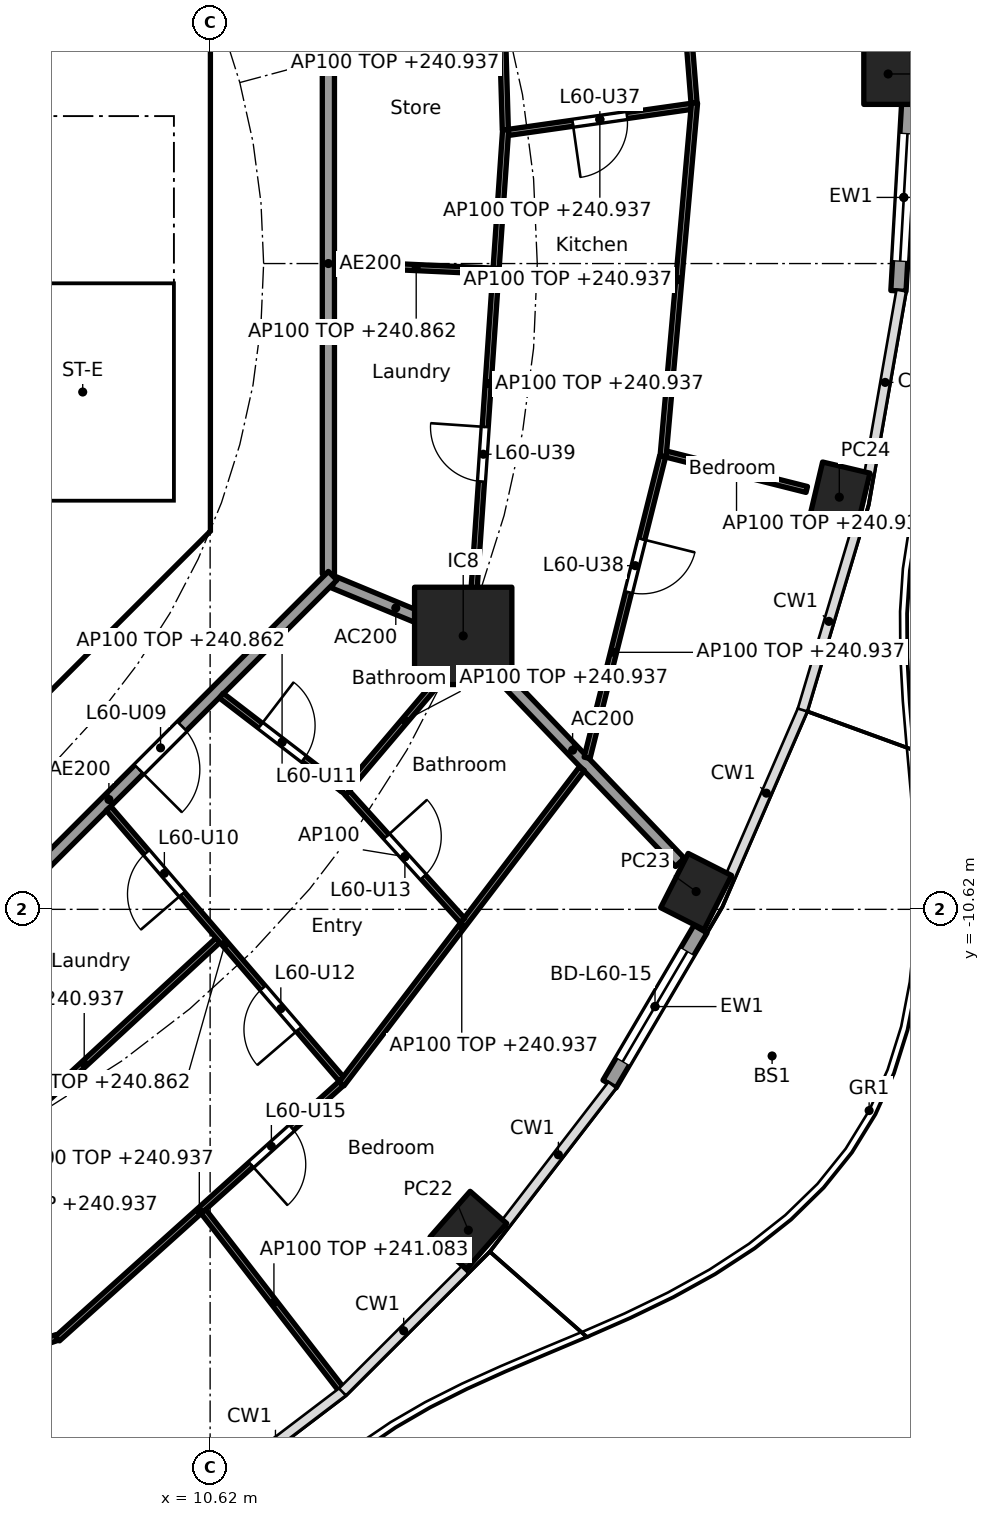
"""IFC4 building model, lengths in metres.
Left out: names, types, materials, properties, quantities, classifications, styles, units other than length and angle.
Written with IfcOpenShell. Run it as: python <this file> out.ifc"""

import sys

from ifc_helpers import new_model, si_unit, direction, frame, frame_2d, origin, origin_2d, place, context, subcontext, project, spatial, polyline, rectangle, hollow_rectangle, outline, extrude, element, fill, save


model = new_model("IFC4")
c1 = context("Model", 3, precision=1e-05, world=origin(), true_north=direction((0.0, 1.0)))
c2 = subcontext(c1, "Body", "Model", "MODEL_VIEW")
j1 = project(units=[si_unit("LENGTHUNIT", "METRE"), si_unit("PLANEANGLEUNIT", "RADIAN")], contexts=[c1])
p1 = place(None, origin())
s1 = spatial("IfcSite", under=j1, at=p1, CompositionType="ELEMENT")
p2 = place(p1, origin())
s2 = spatial("IfcBuilding", under=s1, at=p2, CompositionType="ELEMENT")
p3 = place(p2, frame((0.0, 0.0, 238.1)))
s3 = spatial("IfcBuildingStorey", under=s2, at=p3, CompositionType="ELEMENT", Elevation=238.1)
for number, where, z_axis, x_axis in (
    (1, (21.77, 3.118, 0.0), (0.0, 0.0, 1.0), (0.0, 1.0, 0.0)),
    (2, (14.866, -15.896, 0.0), (0.0, 0.0, 1.0), (0.66, 0.751, 0.0)),
    (3, (18.612, -10.327, 0.0), (0.0, 0.0, 1.0), (0.452, 0.892, 0.0)),
    (4, (20.967, -3.842, 0.0), (0.0, 0.0, 1.0), (0.229, 0.973, 0.0)),
):
    element("IfcColumn", number, at=place(p3, frame(where, z_axis=z_axis, x_axis=x_axis)), inside=s3, PredefinedType="COLUMN", context=c2, shape_type="SweptSolid", body=[
        extrude(hollow_rectangle(XDim=1.0, YDim=0.8, WallThickness=0.032, at=origin_2d()), origin(), (0.0, 0.0, 1.0), 3.7),
    ])
p4 = place(p3, frame((14.782, -6.123, 0.0), z_axis=(0.0, 0.0, 1.0), x_axis=(1.0, 0.0, 0.0)))
e5 = element("IfcColumn", 5, at=p4, inside=s3, PredefinedType="COLUMN", context=c2, shape_type="SweptSolid", body=[
    extrude(rectangle(XDim=1.6, YDim=1.6, at=origin_2d()), origin(), (0.0, 0.0, 1.0), 3.7),
])
p5 = place(p3, frame((18.684, -10.945, 0.0), z_axis=(0.0, 0.0, 1.0), x_axis=(-0.5063555387, -0.862324804484, 0.0)))
e6 = element("IfcWall", 6, at=p5, inside=s3, PredefinedType="SOLIDWALL", context=c2, shape_type="SweptSolid", body=[
    extrude(rectangle(XDim=2.955, YDim=0.25, at=frame_2d((1.477, 0.0))), origin(), (0.0, 0.0, 1.0), 3.44),
])
p6 = place(p5, frame((0.427, 0.0, 0.0)))
e7 = element("IfcOpeningElement", 7, at=p6, cuts=e6, PredefinedType="OPENING", context=c2, shape_type="SweptSolid", body=[
    extrude(rectangle(XDim=2.1, YDim=2.4, at=frame_2d((1.05, 1.2))), frame((0.0, 0.135, 0.0), z_axis=(0.0, -1.0, 0.0), x_axis=(1.0, 0.0, 0.0)), (0.0, 0.0, 1.0), 0.27),
])
p7 = place(p3, frame((22.116, 2.626, 0.0), z_axis=(0.0, 0.0, 1.0), x_axis=(-0.057528189427, -0.998343882348, 0.0)))
e8 = element("IfcWall", 8, at=p7, inside=s3, PredefinedType="SOLIDWALL", context=c2, shape_type="SweptSolid", body=[
    extrude(rectangle(XDim=3.081, YDim=0.25, at=frame_2d((1.541, 0.0))), origin(), (0.0, 0.0, 1.0), 3.44),
])
p8 = place(p7, frame((0.49, 0.0, 0.0)))
e9 = element("IfcOpeningElement", 9, at=p8, cuts=e8, PredefinedType="OPENING", context=c2, shape_type="SweptSolid", body=[
    extrude(rectangle(XDim=2.1, YDim=2.4, at=frame_2d((1.05, 1.2))), frame((0.0, 0.135, 0.0), z_axis=(0.0, -1.0, 0.0), x_axis=(1.0, 0.0, 0.0)), (0.0, 0.0, 1.0), 0.27),
])
p9 = place(p3, frame((4.613, -9.988, 0.0), z_axis=(0.0, 0.0, 1.0), x_axis=(0.707106781187, 0.707106781187, 0.0)))
e10 = element("IfcWall", 10, at=p9, inside=s3, PredefinedType="SHEAR", context=c2, shape_type="SweptSolid", body=[
    extrude(rectangle(XDim=7.602, YDim=0.6, at=frame_2d((3.801, 0.0))), origin(), (0.0, 0.0, 1.0), 3.44),
])
p10 = place(p9, frame((3.201, 0.0, 0.0)))
e11 = element("IfcOpeningElement", 11, at=p10, cuts=e10, PredefinedType="OPENING", context=c2, shape_type="SweptSolid", body=[
    extrude(rectangle(XDim=1.2, YDim=2.1, at=frame_2d((0.6, 1.05))), frame((0.0, 0.31, 0.0), z_axis=(0.0, -1.0, 0.0), x_axis=(1.0, 0.0, 0.0)), (0.0, 0.0, 1.0), 0.62),
])
p11 = place(p3, origin())
e12 = element("IfcWall", 12, at=p11, inside=s3, PredefinedType="SHEAR", context=c2, shape_type="SweptSolid", body=[
    extrude(outline(polyline([(9.776, -4.401), (10.025, -4.152), (10.025, -3.801), (10.025, 4.152), (9.776, 4.401), (10.2, 4.825), (10.625, 4.401), (10.625, -4.401), (10.2, -4.825), (9.776, -4.401)])), origin(), (0.0, 0.0, 1.0), 3.44),
])
p12 = place(p3, origin())
e13 = element("IfcWall", 13, at=p12, inside=s3, PredefinedType="SOLIDWALL", context=c2, shape_type="SweptSolid", body=[
    extrude(outline(polyline([(10.025, -4.1), (6.7, -4.1), (6.7, -3.9), (10.025, -3.9), (10.025, -4.1)])), origin(), (0.0, 0.0, 1.0), 3.44),
])
p13 = place(p3, frame((12.657, -5.243, 0.0), z_axis=(0.0, 0.0, 1.0), x_axis=(0.923853160736, -0.382747093259, 0.0)))
e14 = element("IfcWall", 14, at=p13, inside=s3, PredefinedType="PARTITIONING", context=c2, shape_type="SweptSolid", body=[
    extrude(rectangle(XDim=2.2, YDim=0.2, at=frame_2d((1.1, 0.0))), origin(), (0.0, 0.0, 1.0), 3.44),
])
p14 = place(p3, frame((14.817, -6.159, 0.0), z_axis=(0.0, 0.0, 1.0), x_axis=(0.691437669875, -0.722436120828, 0.0)))
e15 = element("IfcWall", 15, at=p14, inside=s3, PredefinedType="PARTITIONING", context=c2, shape_type="SweptSolid", body=[
    extrude(rectangle(XDim=5.104, YDim=0.2, at=frame_2d((2.552, 0.0))), origin(), (0.0, 0.0, 1.0), 3.44),
])
p15 = place(p3, frame((12.565, -5.104, 0.0), z_axis=(0.0, 0.0, 1.0), x_axis=(0.0, 1.0, 0.0)))
e16 = element("IfcWall", 16, at=p15, inside=s3, PredefinedType="PARTITIONING", context=c2, shape_type="SweptSolid", body=[
    extrude(rectangle(XDim=10.209, YDim=0.2, at=frame_2d((5.104, 0.0))), origin(), (0.0, 0.0, 1.0), 3.44),
])
p16 = place(p3, frame((5.275, -12.494, 0.0), z_axis=(0.0, 0.0, 1.0), x_axis=(0.707106781187, 0.707106781187, 0.0)))
e17 = element("IfcWall", 17, at=p16, inside=s3, PredefinedType="PARTITIONING", context=c2, shape_type="SweptSolid", body=[
    extrude(rectangle(XDim=10.409, YDim=0.2, at=frame_2d((5.205, 0.0))), origin(), (0.0, 0.0, 1.0), 3.44),
])
p17 = place(p16, frame((5.906, 0.0, 0.0)))
e18 = element("IfcOpeningElement", 18, at=p17, cuts=e17, PredefinedType="OPENING", context=c2, shape_type="SweptSolid", body=[
    extrude(rectangle(XDim=1.0, YDim=2.1, at=frame_2d((0.5, 1.05))), frame((0.0, 0.11, 0.0), z_axis=(0.0, -1.0, 0.0), x_axis=(1.0, 0.0, 0.0)), (0.0, 0.0, 1.0), 0.22),
])
p18 = place(p3, frame((15.526, 2.157, 0.0), z_axis=(0.0, 0.0, 1.0), x_axis=(0.989997669831, 0.141083711779, 0.0)))
e19 = element("IfcWall", 19, at=p18, inside=s3, PredefinedType="PARTITIONING", context=c2, shape_type="SweptSolid", body=[
    extrude(rectangle(XDim=3.037, YDim=0.1, at=frame_2d((1.519, 0.0))), origin(), (0.0, 0.0, 1.0), 2.837),
])
p19 = place(p18, frame((1.069, 0.0, 0.0)))
e20 = element("IfcOpeningElement", 20, at=p19, cuts=e19, PredefinedType="OPENING", context=c2, shape_type="SweptSolid", body=[
    extrude(rectangle(XDim=0.9, YDim=2.1, at=frame_2d((0.45, 1.05))), frame((0.0, 0.06, 0.0), z_axis=(0.0, -1.0, 0.0), x_axis=(1.0, 0.0, 0.0)), (0.0, 0.0, 1.0), 0.12),
])
p20 = place(p3, frame((15.475, 2.2, 0.0), z_axis=(0.0, 0.0, 1.0), x_axis=(-0.029254637498, 0.999571991497, 0.0)))
e21 = element("IfcWall", 21, at=p20, inside=s3, PredefinedType="PARTITIONING", context=c2, shape_type="SweptSolid", body=[
    extrude(rectangle(XDim=4.223, YDim=0.1, at=frame_2d((2.111, 0.0))), origin(), (0.0, 0.0, 1.0), 2.837),
])
p21 = place(p20, frame((1.661, 0.0, 0.0)))
e22 = element("IfcOpeningElement", 22, at=p21, cuts=e21, PredefinedType="OPENING", context=c2, shape_type="SweptSolid", body=[
    extrude(rectangle(XDim=0.9, YDim=2.1, at=frame_2d((0.45, 1.05))), frame((0.0, 0.06, 0.0), z_axis=(0.0, -1.0, 0.0), x_axis=(1.0, 0.0, 0.0)), (0.0, 0.0, 1.0), 0.12),
])
p22 = place(p3, frame((15.48, 2.199, 0.0), z_axis=(0.0, 0.0, 1.0), x_axis=(-0.068558685949, -0.997647085186, 0.0)))
e23 = element("IfcWall", 23, at=p22, inside=s3, PredefinedType="PARTITIONING", context=c2, shape_type="SweptSolid", body=[
    extrude(rectangle(XDim=8.365, YDim=0.1, at=frame_2d((4.183, 0.0))), origin(), (0.0, 0.0, 1.0), 2.837),
])
p23 = place(p22, frame((4.898, 0.0, 0.0)))
e24 = element("IfcOpeningElement", 24, at=p23, cuts=e23, PredefinedType="OPENING", context=c2, shape_type="SweptSolid", body=[
    extrude(rectangle(XDim=0.9, YDim=2.1, at=frame_2d((0.45, 1.05))), frame((0.0, 0.06, 0.0), z_axis=(0.0, -1.0, 0.0), x_axis=(1.0, 0.0, 0.0)), (0.0, 0.0, 1.0), 0.12),
])
p24 = place(p3, frame((18.578, 2.642, 0.0), z_axis=(0.0, 0.0, 1.0), x_axis=(-0.079179272956, 0.9968603928, 0.0)))
e25 = element("IfcWall", 25, at=p24, inside=s3, PredefinedType="PARTITIONING", context=c2, shape_type="SweptSolid", body=[
    extrude(rectangle(XDim=5.504, YDim=0.1, at=frame_2d((2.752, 0.0))), origin(), (0.0, 0.0, 1.0), 2.837),
])
p25 = place(p24, frame((0.926, 0.0, 0.0)))
e26 = element("IfcOpeningElement", 26, at=p25, cuts=e25, PredefinedType="OPENING", context=c2, shape_type="SweptSolid", body=[
    extrude(rectangle(XDim=0.9, YDim=2.1, at=frame_2d((0.45, 1.05))), frame((0.0, 0.06, 0.0), z_axis=(0.0, -1.0, 0.0), x_axis=(1.0, 0.0, 0.0)), (0.0, 0.0, 1.0), 0.12),
])
p26 = place(p3, frame((18.586, 2.642, 0.0), z_axis=(0.0, 0.0, 1.0), x_axis=(-0.088638473361, -0.996063863937, 0.0)))
e27 = element("IfcWall", 27, at=p26, inside=s3, PredefinedType="PARTITIONING", context=c2, shape_type="SweptSolid", body=[
    extrude(rectangle(XDim=5.836, YDim=0.1, at=frame_2d((2.918, 0.0))), origin(), (0.0, 0.0, 1.0), 2.837),
])
p27 = place(p3, frame((3.453, -19.229, 0.0), z_axis=(0.0, 0.0, 1.0), x_axis=(0.947572025416, 0.319542261133, 0.0)))
e28 = element("IfcWall", 28, at=p27, inside=s3, PredefinedType="PARTITIONING", context=c2, shape_type="SweptSolid", body=[
    extrude(rectangle(XDim=4.903, YDim=0.1, at=frame_2d((2.451, 0.0))), origin(), (0.0, 0.0, 1.0), 2.837),
])
p28 = place(p27, frame((2.001, 0.0, 0.0)))
e29 = element("IfcOpeningElement", 29, at=p28, cuts=e28, PredefinedType="OPENING", context=c2, shape_type="SweptSolid", body=[
    extrude(rectangle(XDim=0.9, YDim=2.1, at=frame_2d((0.45, 1.05))), frame((0.0, 0.06, 0.0), z_axis=(0.0, -1.0, 0.0), x_axis=(1.0, 0.0, 0.0)), (0.0, 0.0, 1.0), 0.12),
])
p29 = place(p3, frame((6.351, -15.19, 0.0), z_axis=(0.0, 0.0, 1.0), x_axis=(0.73462674599, 0.678471476243, 0.0)))
e30 = element("IfcWall", 30, at=p29, inside=s3, PredefinedType="PARTITIONING", context=c2, shape_type="SweptSolid", body=[
    extrude(rectangle(XDim=5.987, YDim=0.1, at=frame_2d((2.993, 0.0))), origin(), (0.0, 0.0, 1.0), 2.837),
])
p30 = place(p3, frame((8.109, -17.679, 0.0), z_axis=(0.0, 0.0, 1.0), x_axis=(0.743675165651, 0.668541134108, 0.0)))
e31 = element("IfcWall", 31, at=p30, inside=s3, PredefinedType="PARTITIONING", context=c2, shape_type="SweptSolid", body=[
    extrude(rectangle(XDim=6.275, YDim=0.1, at=frame_2d((3.137, 0.0))), origin(), (0.0, 0.0, 1.0), 2.837),
])
p31 = place(p30, frame((4.281, 0.0, 0.0)))
e32 = element("IfcOpeningElement", 32, at=p31, cuts=e31, PredefinedType="OPENING", context=c2, shape_type="SweptSolid", body=[
    extrude(rectangle(XDim=0.9, YDim=2.1, at=frame_2d((0.45, 1.05))), frame((0.0, 0.06, 0.0), z_axis=(0.0, -1.0, 0.0), x_axis=(1.0, 0.0, 0.0)), (0.0, 0.0, 1.0), 0.12),
])
p32 = place(p3, frame((10.51, -15.588, 0.0), z_axis=(0.0, 0.0, 1.0), x_axis=(0.612443725286, -0.79051418922, 0.0)))
e33 = element("IfcWall", 33, at=p32, inside=s3, PredefinedType="PARTITIONING", context=c2, shape_type="SweptSolid", body=[
    extrude(rectangle(XDim=3.785, YDim=0.1, at=frame_2d((1.893, 0.0))), origin(), (0.0, 0.0, 1.0), 2.983),
])
p33 = place(p3, frame((8.95, -8.96, 0.0), z_axis=(0.0, 0.0, 1.0), x_axis=(0.652098047064, -0.758134643065, 0.0)))
e34 = element("IfcWall", 34, at=p33, inside=s3, PredefinedType="PARTITIONING", context=c2, shape_type="SweptSolid", body=[
    extrude(rectangle(XDim=5.874, YDim=0.1, at=frame_2d((2.937, 0.0))), origin(), (0.0, 0.0, 1.0), 2.762),
])
p34 = place(p33, frame((0.957, 0.0, 0.0)))
e35 = element("IfcOpeningElement", 35, at=p34, cuts=e34, PredefinedType="OPENING", context=c2, shape_type="SweptSolid", body=[
    extrude(rectangle(XDim=0.9, YDim=2.1, at=frame_2d((0.45, 1.05))), frame((0.0, 0.06, 0.0), z_axis=(0.0, -1.0, 0.0), x_axis=(1.0, 0.0, 0.0)), (0.0, 0.0, 1.0), 0.12),
])
p35 = place(p33, frame((3.894, 0.0, 0.0)))
e36 = element("IfcOpeningElement", 36, at=p35, cuts=e34, PredefinedType="OPENING", context=c2, shape_type="SweptSolid", body=[
    extrude(rectangle(XDim=0.9, YDim=2.1, at=frame_2d((0.45, 1.05))), frame((0.0, 0.06, 0.0), z_axis=(0.0, -1.0, 0.0), x_axis=(1.0, 0.0, 0.0)), (0.0, 0.0, 1.0), 0.12),
])
p36 = place(p3, frame((12.782, -13.491, 0.0), z_axis=(0.0, 0.0, 1.0), x_axis=(0.606141365852, 0.79535692906, 0.0)))
e37 = element("IfcWall", 37, at=p36, inside=s3, PredefinedType="PARTITIONING", context=c2, shape_type="SweptSolid", body=[
    extrude(rectangle(XDim=6.52, YDim=0.1, at=frame_2d((3.26, 0.0))), origin(), (0.0, 0.0, 1.0), 2.837),
])
p37 = place(p3, frame((10.804, -7.105, 0.0), z_axis=(0.0, 0.0, 1.0), x_axis=(0.793311502848, -0.608815948747, 0.0)))
e38 = element("IfcWall", 38, at=p37, inside=s3, PredefinedType="PARTITIONING", context=c2, shape_type="SweptSolid", body=[
    extrude(rectangle(XDim=2.52, YDim=0.1, at=frame_2d((1.26, 0.0))), origin(), (0.0, 0.0, 1.0), 2.762),
])
p38 = place(p37, frame((0.81, 0.0, 0.0)))
e39 = element("IfcOpeningElement", 39, at=p38, cuts=e38, PredefinedType="OPENING", context=c2, shape_type="SweptSolid", body=[
    extrude(rectangle(XDim=0.9, YDim=2.1, at=frame_2d((0.45, 1.05))), frame((0.0, 0.06, 0.0), z_axis=(0.0, -1.0, 0.0), x_axis=(1.0, 0.0, 0.0)), (0.0, 0.0, 1.0), 0.12),
])
p39 = place(p3, frame((12.876, -8.707, 0.0), z_axis=(0.0, 0.0, 1.0), x_axis=(0.670768418052, -0.741666858733, 0.0)))
e40 = element("IfcWall", 40, at=p39, inside=s3, PredefinedType="PARTITIONING", context=c2, shape_type="SweptSolid", body=[
    extrude(rectangle(XDim=2.824, YDim=0.1, at=frame_2d((1.412, 0.0))), origin(), (0.0, 0.0, 1.0), 3.44),
])
p40 = place(p39, frame((0.962, 0.0, 0.0)))
e41 = element("IfcOpeningElement", 41, at=p40, cuts=e40, PredefinedType="OPENING", context=c2, shape_type="SweptSolid", body=[
    extrude(rectangle(XDim=0.9, YDim=2.1, at=frame_2d((0.45, 1.05))), frame((0.0, 0.06, 0.0), z_axis=(0.0, -1.0, 0.0), x_axis=(1.0, 0.0, 0.0)), (0.0, 0.0, 1.0), 0.12),
])
p41 = place(p3, frame((12.81, -8.708, 0.0), z_axis=(0.0, 0.0, 1.0), x_axis=(0.646973324627, 0.762512634138, 0.0)))
e42 = element("IfcWall", 42, at=p41, inside=s3, PredefinedType="PARTITIONING", context=c2, shape_type="SweptSolid", body=[
    extrude(rectangle(XDim=3.129, YDim=0.1, at=frame_2d((1.565, 0.0))), origin(), (0.0, 0.0, 1.0), 2.837),
])
p42 = place(p3, frame((16.819, -8.129, 0.0), z_axis=(0.0, 0.0, 1.0), x_axis=(0.243041266705, 0.970015949703, 0.0)))
e43 = element("IfcWall", 43, at=p42, inside=s3, PredefinedType="PARTITIONING", context=c2, shape_type="SweptSolid", body=[
    extrude(rectangle(XDim=5.112, YDim=0.1, at=frame_2d((2.556, 0.0))), origin(), (0.0, 0.0, 1.0), 2.837),
])
p43 = place(p42, frame((2.808, 0.0, 0.0)))
e44 = element("IfcOpeningElement", 44, at=p43, cuts=e43, PredefinedType="OPENING", context=c2, shape_type="SweptSolid", body=[
    extrude(rectangle(XDim=0.9, YDim=2.1, at=frame_2d((0.45, 1.05))), frame((0.0, 0.06, 0.0), z_axis=(0.0, -1.0, 0.0), x_axis=(1.0, 0.0, 0.0)), (0.0, 0.0, 1.0), 0.12),
])
p44 = place(p3, frame((18.122, -3.134, 0.0), z_axis=(0.0, 0.0, 1.0), x_axis=(0.969755347697, -0.244079015102, 0.0)))
e45 = element("IfcWall", 45, at=p44, inside=s3, PredefinedType="PARTITIONING", context=c2, shape_type="SweptSolid", body=[
    extrude(rectangle(XDim=2.382, YDim=0.1, at=frame_2d((1.191, 0.0))), origin(), (0.0, 0.0, 1.0), 2.837),
])
p45 = place(p3, frame((12.665, -0.005, 0.0), z_axis=(0.0, 0.0, 1.0), x_axis=(0.998950319191, -0.045806765749, 0.0)))
e46 = element("IfcWall", 46, at=p45, inside=s3, PredefinedType="PARTITIONING", context=c2, shape_type="SweptSolid", body=[
    extrude(rectangle(XDim=2.692, YDim=0.1, at=frame_2d((1.346, 0.0))), origin(), (0.0, 0.0, 1.0), 2.762),
])
p46 = place(p6, origin())
e47 = element("IfcDoor", 47, at=p46, inside=s3, OperationType="SLIDING_TO_LEFT", PredefinedType="DOOR", context=c2, shape_type="SweptSolid", body=[
    extrude(rectangle(XDim=2.1, YDim=2.4, at=frame_2d((1.05, 1.2))), frame((0.0, 0.025, 0.0), z_axis=(0.0, -1.0, 0.0), x_axis=(1.0, 0.0, 0.0)), (0.0, 0.0, 1.0), 0.05),
])
fill(e7, e47)
p47 = place(p8, origin())
e48 = element("IfcDoor", 48, at=p47, inside=s3, OperationType="SLIDING_TO_LEFT", PredefinedType="DOOR", context=c2, shape_type="SweptSolid", body=[
    extrude(rectangle(XDim=2.1, YDim=2.4, at=frame_2d((1.05, 1.2))), frame((0.0, 0.025, 0.0), z_axis=(0.0, -1.0, 0.0), x_axis=(1.0, 0.0, 0.0)), (0.0, 0.0, 1.0), 0.05),
])
fill(e9, e48)
p48 = place(p17, frame((1.0, 0.0, 0.0), x_axis=(-1.0, 0.0, 0.0)))
e49 = element("IfcDoor", 49, at=p48, inside=s3, OperationType="SINGLE_SWING_RIGHT", PredefinedType="DOOR", context=c2, shape_type="SweptSolid", body=[
    extrude(rectangle(XDim=1.0, YDim=2.1, at=frame_2d((0.5, 1.05))), frame((0.0, 0.025, 0.0), z_axis=(0.0, -1.0, 0.0), x_axis=(1.0, 0.0, 0.0)), (0.0, 0.0, 1.0), 0.05),
])
fill(e18, e49)
p49 = place(p34, frame((0.9, 0.0, 0.0), x_axis=(-1.0, 0.0, 0.0)))
e50 = element("IfcDoor", 50, at=p49, inside=s3, OperationType="SINGLE_SWING_LEFT", PredefinedType="DOOR", context=c2, shape_type="SweptSolid", body=[
    extrude(rectangle(XDim=0.9, YDim=2.1, at=frame_2d((0.45, 1.05))), frame((0.0, 0.025, 0.0), z_axis=(0.0, -1.0, 0.0), x_axis=(1.0, 0.0, 0.0)), (0.0, 0.0, 1.0), 0.05),
])
fill(e35, e50)
p50 = place(p38, origin())
e51 = element("IfcDoor", 51, at=p50, inside=s3, OperationType="SINGLE_SWING_LEFT", PredefinedType="DOOR", context=c2, shape_type="SweptSolid", body=[
    extrude(rectangle(XDim=0.9, YDim=2.1, at=frame_2d((0.45, 1.05))), frame((0.0, 0.025, 0.0), z_axis=(0.0, -1.0, 0.0), x_axis=(1.0, 0.0, 0.0)), (0.0, 0.0, 1.0), 0.05),
])
fill(e39, e51)
p51 = place(p35, frame((0.9, 0.0, 0.0), x_axis=(-1.0, 0.0, 0.0)))
e52 = element("IfcDoor", 52, at=p51, inside=s3, OperationType="SINGLE_SWING_LEFT", PredefinedType="DOOR", context=c2, shape_type="SweptSolid", body=[
    extrude(rectangle(XDim=0.9, YDim=2.1, at=frame_2d((0.45, 1.05))), frame((0.0, 0.025, 0.0), z_axis=(0.0, -1.0, 0.0), x_axis=(1.0, 0.0, 0.0)), (0.0, 0.0, 1.0), 0.05),
])
fill(e36, e52)
p52 = place(p40, origin())
e53 = element("IfcDoor", 53, at=p52, inside=s3, OperationType="SINGLE_SWING_LEFT", PredefinedType="DOOR", context=c2, shape_type="SweptSolid", body=[
    extrude(rectangle(XDim=0.9, YDim=2.1, at=frame_2d((0.45, 1.05))), frame((0.0, 0.025, 0.0), z_axis=(0.0, -1.0, 0.0), x_axis=(1.0, 0.0, 0.0)), (0.0, 0.0, 1.0), 0.05),
])
fill(e41, e53)
p53 = place(p31, frame((0.9, 0.0, 0.0), x_axis=(-1.0, 0.0, 0.0)))
e54 = element("IfcDoor", 54, at=p53, inside=s3, OperationType="SINGLE_SWING_RIGHT", PredefinedType="DOOR", context=c2, shape_type="SweptSolid", body=[
    extrude(rectangle(XDim=0.9, YDim=2.1, at=frame_2d((0.45, 1.05))), frame((0.0, 0.025, 0.0), z_axis=(0.0, -1.0, 0.0), x_axis=(1.0, 0.0, 0.0)), (0.0, 0.0, 1.0), 0.05),
])
fill(e32, e54)
p54 = place(p19, frame((0.9, 0.0, 0.0), x_axis=(-1.0, 0.0, 0.0)))
e55 = element("IfcDoor", 55, at=p54, inside=s3, OperationType="SINGLE_SWING_RIGHT", PredefinedType="DOOR", context=c2, shape_type="SweptSolid", body=[
    extrude(rectangle(XDim=0.9, YDim=2.1, at=frame_2d((0.45, 1.05))), frame((0.0, 0.025, 0.0), z_axis=(0.0, -1.0, 0.0), x_axis=(1.0, 0.0, 0.0)), (0.0, 0.0, 1.0), 0.05),
])
fill(e20, e55)
p55 = place(p43, frame((0.9, 0.0, 0.0), x_axis=(-1.0, 0.0, 0.0)))
e56 = element("IfcDoor", 56, at=p55, inside=s3, OperationType="SINGLE_SWING_LEFT", PredefinedType="DOOR", context=c2, shape_type="SweptSolid", body=[
    extrude(rectangle(XDim=0.9, YDim=2.1, at=frame_2d((0.45, 1.05))), frame((0.0, 0.025, 0.0), z_axis=(0.0, -1.0, 0.0), x_axis=(1.0, 0.0, 0.0)), (0.0, 0.0, 1.0), 0.05),
])
fill(e44, e56)
p56 = place(p23, frame((0.9, 0.0, 0.0), x_axis=(-1.0, 0.0, 0.0)))
e57 = element("IfcDoor", 57, at=p56, inside=s3, OperationType="SINGLE_SWING_RIGHT", PredefinedType="DOOR", context=c2, shape_type="SweptSolid", body=[
    extrude(rectangle(XDim=0.9, YDim=2.1, at=frame_2d((0.45, 1.05))), frame((0.0, 0.025, 0.0), z_axis=(0.0, -1.0, 0.0), x_axis=(1.0, 0.0, 0.0)), (0.0, 0.0, 1.0), 0.05),
])
fill(e24, e57)
save(model, sys.argv[1])
